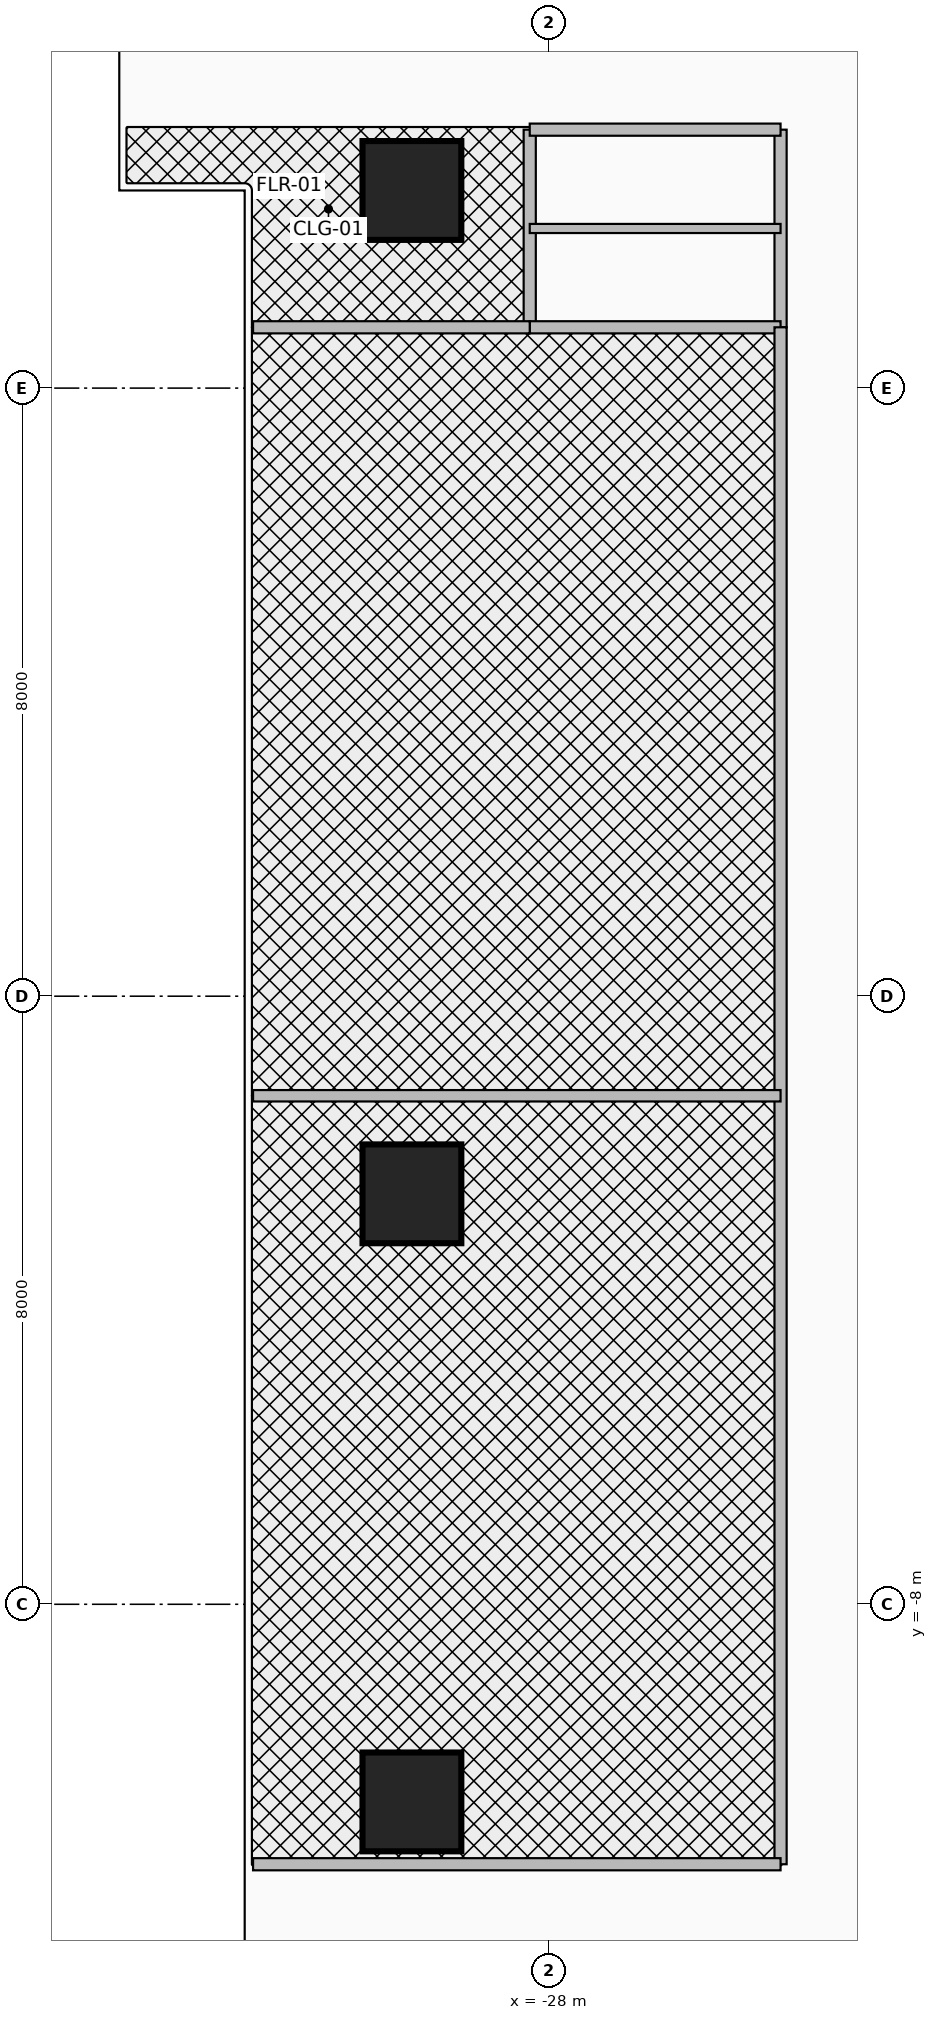
"""IFC4 building model, lengths in metres.
Left out: names, types, materials, properties, quantities, classifications, styles, units other than length and angle.
Written with IfcOpenShell. Run it as: python <this file> out.ifc"""

import sys

from ifc_helpers import new_model, si_unit, direction, frame, frame_2d, origin, origin_2d, place, context, subcontext, project, spatial, rectangle, circle, extrude, source, transform, mapped, element, fill, save


model = new_model("IFC4")
c1 = context("Model", 3, precision=1e-05, world=origin(), true_north=direction((0.0, 1.0)))
c2 = subcontext(c1, "Body", "Model", "MODEL_VIEW")
j1 = project(units=[si_unit("LENGTHUNIT", "METRE"), si_unit("PLANEANGLEUNIT", "RADIAN")], contexts=[c1])
p1 = place(None, origin())
s1 = spatial("IfcSite", under=j1, at=p1, CompositionType="ELEMENT")
p2 = place(p1, origin())
s2 = spatial("IfcBuilding", under=s1, at=p2, CompositionType="ELEMENT")
p3 = place(p2, frame((0.0, 0.0, 48.2)))
s3 = spatial("IfcBuildingStorey", under=s2, at=p3, CompositionType="ELEMENT", Elevation=48.2)
m1 = source(origin(), c2, "Body", "SweptSolid", [
    extrude(circle(Radius=0.65, at=origin_2d()), origin(), (0.0, 0.0, 1.0), 3.7),
])
for number, where, z_axis, x_axis in (
    (1, (-29.8, -10.6, 0.0), (0.0, 0.0, 1.0), (1.0, 0.0, 0.0)),
    (2, (-29.8, -2.6, 0.0), (0.0, 0.0, 1.0), (1.0, 0.0, 0.0)),
    (3, (-29.8, 10.6, 0.0), (0.0, 0.0, 1.0), (1.0, 0.0, 0.0)),
):
    element("IfcColumn", number, at=place(p3, frame(where, z_axis=z_axis, x_axis=x_axis)), inside=s3, PredefinedType="COLUMN", context=c2, shape_type="MappedRepresentation", body=[
        mapped(m1, transform((0.0, 0.0, 0.0), x_axis=(1.0, 0.0, 0.0), y_axis=(0.0, 1.0, 0.0), z_axis=(0.0, 0.0, 1.0), scale=1.0)),
    ])
p4 = place(p3, frame((-28.25, 8.8, 0.0), z_axis=(0.0, 0.0, 1.0), x_axis=(0.0, 1.0, 0.0)))
e4 = element("IfcWall", 4, at=p4, inside=s3, PredefinedType="PARTITIONING", context=c2, shape_type="SweptSolid", body=[
    extrude(rectangle(XDim=2.6, YDim=0.16, at=frame_2d((1.3, 0.0))), origin(), (0.0, 0.0, 1.0), 2.583),
])
p5 = place(p3, frame((-24.95, 8.8, 0.0), z_axis=(0.0, 0.0, 1.0), x_axis=(0.0, 1.0, 0.0)))
e5 = element("IfcWall", 5, at=p5, inside=s3, PredefinedType="PARTITIONING", context=c2, shape_type="SweptSolid", body=[
    extrude(rectangle(XDim=2.6, YDim=0.16, at=frame_2d((1.3, 0.0))), origin(), (0.0, 0.0, 1.0), 2.583),
])
p6 = place(p5, frame((0.3, 0.0, 0.0)))
e6 = element("IfcOpeningElement", 6, at=p6, cuts=e5, PredefinedType="OPENING", context=c2, shape_type="SweptSolid", body=[
    extrude(rectangle(XDim=0.85, YDim=2.1, at=frame_2d((0.425, 1.05))), frame((0.0, 0.095, 0.0), z_axis=(0.0, -1.0, 0.0), x_axis=(1.0, 0.0, 0.0)), (0.0, 0.0, 1.0), 0.19),
])
p7 = place(p5, frame((1.45, 0.0, 0.0)))
e7 = element("IfcOpeningElement", 7, at=p7, cuts=e5, PredefinedType="OPENING", context=c2, shape_type="SweptSolid", body=[
    extrude(rectangle(XDim=0.85, YDim=2.1, at=frame_2d((0.425, 1.05))), frame((0.0, 0.095, 0.0), z_axis=(0.0, -1.0, 0.0), x_axis=(1.0, 0.0, 0.0)), (0.0, 0.0, 1.0), 0.19),
])
for number, where, z_axis, x_axis in (
    (8, (-28.25, 8.8, 0.0), (0.0, 0.0, 1.0), (1.0, 0.0, 0.0)),
    (9, (-28.25, 11.4, 0.0), (0.0, 0.0, 1.0), (1.0, 0.0, 0.0)),
):
    element("IfcWall", number, at=place(p3, frame(where, z_axis=z_axis, x_axis=x_axis)), inside=s3, PredefinedType="PARTITIONING", context=c2, shape_type="SweptSolid", body=[
        extrude(rectangle(XDim=3.3, YDim=0.16, at=frame_2d((1.65, 0.0))), origin(), (0.0, 0.0, 1.0), 3.46),
    ])
p8 = place(p3, frame((-28.25, 10.1, 0.0), z_axis=(0.0, 0.0, 1.0), x_axis=(1.0, 0.0, 0.0)))
e10 = element("IfcWall", 10, at=p8, inside=s3, PredefinedType="PARTITIONING", context=c2, shape_type="SweptSolid", body=[
    extrude(rectangle(XDim=3.3, YDim=0.12, at=frame_2d((1.65, 0.0))), origin(), (0.0, 0.0, 1.0), 3.46),
])
p9 = place(p3, frame((-24.95, -11.42, 0.0), z_axis=(0.0, 0.0, 1.0), x_axis=(0.0, 1.0, 0.0)))
e11 = element("IfcWall", 11, at=p9, inside=s3, PredefinedType="PARTITIONING", context=c2, shape_type="SweptSolid", body=[
    extrude(rectangle(XDim=20.22, YDim=0.16, at=frame_2d((10.11, 0.0))), origin(), (0.0, 0.0, 1.0), 2.583),
])
p10 = place(p9, frame((4.155, 0.0, 0.0)))
e12 = element("IfcOpeningElement", 12, at=p10, cuts=e11, PredefinedType="OPENING", context=c2, shape_type="SweptSolid", body=[
    extrude(rectangle(XDim=1.8, YDim=2.15, at=frame_2d((0.9, 1.075))), frame((0.0, 0.095, 0.0), z_axis=(0.0, -1.0, 0.0), x_axis=(1.0, 0.0, 0.0)), (0.0, 0.0, 1.0), 0.19),
])
p11 = place(p9, frame((14.715, 0.0, 0.0)))
e13 = element("IfcOpeningElement", 13, at=p11, cuts=e11, PredefinedType="OPENING", context=c2, shape_type="SweptSolid", body=[
    extrude(rectangle(XDim=0.9, YDim=2.1, at=frame_2d((0.45, 1.05))), frame((0.0, 0.095, 0.0), z_axis=(0.0, -1.0, 0.0), x_axis=(1.0, 0.0, 0.0)), (0.0, 0.0, 1.0), 0.19),
])
p12 = place(p3, frame((-31.89, 8.8, 0.0), z_axis=(0.0, 0.0, 1.0), x_axis=(1.0, 0.0, 0.0)))
e14 = element("IfcWall", 14, at=p12, inside=s3, PredefinedType="PARTITIONING", context=c2, shape_type="SweptSolid", body=[
    extrude(rectangle(XDim=3.64, YDim=0.16, at=frame_2d((1.82, 0.0))), origin(), (0.0, 0.0, 1.0), 2.896),
])
p13 = place(p12, frame((0.32, 0.0, 0.0)))
e15 = element("IfcOpeningElement", 15, at=p13, cuts=e14, PredefinedType="OPENING", context=c2, shape_type="SweptSolid", body=[
    extrude(rectangle(XDim=0.9, YDim=2.1, at=frame_2d((0.45, 1.05))), frame((0.0, 0.095, 0.0), z_axis=(0.0, -1.0, 0.0), x_axis=(1.0, 0.0, 0.0)), (0.0, 0.0, 1.0), 0.19),
])
p14 = place(p3, frame((-31.89, -1.31, 0.0), z_axis=(0.0, 0.0, 1.0), x_axis=(1.0, 0.0, 0.0)))
e16 = element("IfcWall", 16, at=p14, inside=s3, PredefinedType="PARTITIONING", context=c2, shape_type="SweptSolid", body=[
    extrude(rectangle(XDim=6.94, YDim=0.15, at=frame_2d((3.47, 0.0))), origin(), (0.0, 0.0, 1.0), 2.896),
])
p15 = place(p3, frame((-31.89, -11.42, 0.0), z_axis=(0.0, 0.0, 1.0), x_axis=(1.0, 0.0, 0.0)))
e17 = element("IfcWall", 17, at=p15, inside=s3, PredefinedType="PARTITIONING", context=c2, shape_type="SweptSolid", body=[
    extrude(rectangle(XDim=6.94, YDim=0.16, at=frame_2d((3.47, 0.0))), origin(), (0.0, 0.0, 1.0), 3.46),
])
p16 = place(p6, origin())
e18 = element("IfcDoor", 18, at=p16, inside=s3, OperationType="SINGLE_SWING_LEFT", PredefinedType="DOOR", context=c2, shape_type="SweptSolid", body=[
    extrude(rectangle(XDim=0.85, YDim=2.1, at=frame_2d((0.425, 1.05))), frame((0.0, 0.025, 0.0), z_axis=(0.0, -1.0, 0.0), x_axis=(1.0, 0.0, 0.0)), (0.0, 0.0, 1.0), 0.05),
])
fill(e6, e18)
p17 = place(p7, origin())
e19 = element("IfcDoor", 19, at=p17, inside=s3, OperationType="SINGLE_SWING_RIGHT", PredefinedType="DOOR", context=c2, shape_type="SweptSolid", body=[
    extrude(rectangle(XDim=0.85, YDim=2.1, at=frame_2d((0.425, 1.05))), frame((0.0, 0.025, 0.0), z_axis=(0.0, -1.0, 0.0), x_axis=(1.0, 0.0, 0.0)), (0.0, 0.0, 1.0), 0.05),
])
fill(e7, e19)
p18 = place(p13, frame((0.9, 0.0, 0.0), z_axis=(0.0, 0.0, 1.0), x_axis=(-1.0, 0.0, 0.0)))
e20 = element("IfcDoor", 20, at=p18, inside=s3, OperationType="SINGLE_SWING_LEFT", PredefinedType="DOOR", context=c2, shape_type="SweptSolid", body=[
    extrude(rectangle(XDim=0.9, YDim=2.1, at=frame_2d((0.45, 1.05))), frame((0.0, 0.025, 0.0), z_axis=(0.0, -1.0, 0.0), x_axis=(1.0, 0.0, 0.0)), (0.0, 0.0, 1.0), 0.05),
])
fill(e15, e20)
p19 = place(p10, origin())
e21 = element("IfcDoor", 21, at=p19, inside=s3, OperationType="DOUBLE_DOOR_SINGLE_SWING", PredefinedType="DOOR", context=c2, shape_type="SweptSolid", body=[
    extrude(rectangle(XDim=1.8, YDim=2.15, at=frame_2d((0.9, 1.075))), frame((0.0, 0.025, 0.0), z_axis=(0.0, -1.0, 0.0), x_axis=(1.0, 0.0, 0.0)), (0.0, 0.0, 1.0), 0.05),
])
fill(e12, e21)
p20 = place(p11, frame((0.9, 0.0, 0.0), z_axis=(0.0, 0.0, 1.0), x_axis=(-1.0, 0.0, 0.0)))
e22 = element("IfcDoor", 22, at=p20, inside=s3, OperationType="SINGLE_SWING_LEFT", PredefinedType="DOOR", context=c2, shape_type="SweptSolid", body=[
    extrude(rectangle(XDim=0.9, YDim=2.1, at=frame_2d((0.45, 1.05))), frame((0.0, 0.025, 0.0), z_axis=(0.0, -1.0, 0.0), x_axis=(1.0, 0.0, 0.0)), (0.0, 0.0, 1.0), 0.05),
])
fill(e13, e22)
save(model, sys.argv[1])
